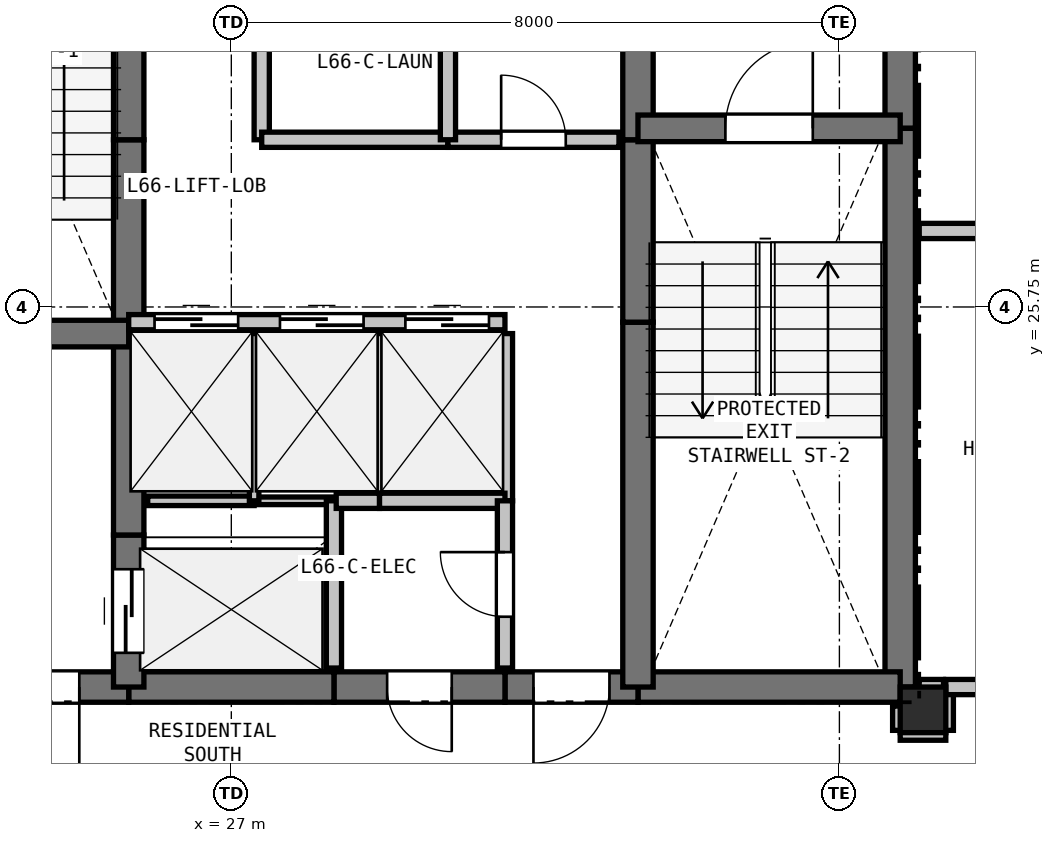
"""IFC4 building model, lengths in metres.
Left out: names, types, materials, properties, quantities, classifications, styles, units other than length and angle.
Written with IfcOpenShell. Run it as: python <this file> out.ifc"""

import sys

from ifc_helpers import new_model, si_unit, direction, frame, frame_2d, origin, origin_2d, place, context, subcontext, project, spatial, rectangle, extrude, element, fill, save


model = new_model("IFC4")
c1 = context("Model", 3, precision=1e-05, world=origin(), true_north=direction((0.0, 1.0)))
c2 = subcontext(c1, "Body", "Model", "MODEL_VIEW")
j1 = project(units=[si_unit("LENGTHUNIT", "METRE"), si_unit("PLANEANGLEUNIT", "RADIAN")], contexts=[c1])
p1 = place(None, origin())
s1 = spatial("IfcSite", under=j1, at=p1, CompositionType="ELEMENT")
p2 = place(p1, origin())
s2 = spatial("IfcBuilding", under=s1, at=p2, CompositionType="ELEMENT")
p3 = place(p2, frame((0.0, 0.0, 236.4)))
s3 = spatial("IfcBuildingStorey", under=s2, at=p3, CompositionType="ELEMENT", Elevation=236.4)
p4 = place(p3, frame((36.1, 20.45, 0.0), z_axis=(0.0, 0.0, 1.0), x_axis=(1.0, 0.0, 0.0)))
e1 = element("IfcColumn", 1, at=p4, inside=s3, PredefinedType="COLUMN", context=c2, shape_type="SweptSolid", body=[
    extrude(rectangle(XDim=0.6, YDim=0.6, at=origin_2d()), origin(), (0.0, 0.0, 1.0), 3.3),
])
p5 = place(p3, frame((35.8, 32.75, 0.0), z_axis=(0.0, 0.0, 1.0), x_axis=(0.0, -1.0, 0.0)))
e2 = element("IfcWall", 2, at=p5, inside=s3, PredefinedType="SHEAR", context=c2, shape_type="SweptSolid", body=[
    extrude(rectangle(XDim=4.65, YDim=0.4, at=frame_2d((2.325, 0.0))), origin(), (0.0, 0.0, 1.0), 3.08),
])
p6 = place(p3, frame((35.8, 28.1, 0.0), z_axis=(0.0, 0.0, 1.0), x_axis=(0.0, -1.0, 0.0)))
e3 = element("IfcWall", 3, at=p6, inside=s3, PredefinedType="SHEAR", context=c2, shape_type="SweptSolid", body=[
    extrude(rectangle(XDim=7.35, YDim=0.4, at=frame_2d((3.675, 0.0))), origin(), (0.0, 0.0, 1.0), 3.08),
])
p7 = place(p3, frame((35.8, 20.75, 0.0), z_axis=(0.0, 0.0, 1.0), x_axis=(-1.0, 0.0, 0.0)))
e4 = element("IfcWall", 4, at=p7, inside=s3, PredefinedType="SHEAR", context=c2, shape_type="SweptSolid", body=[
    extrude(rectangle(XDim=3.45, YDim=0.4, at=frame_2d((1.725, 0.0))), origin(), (0.0, 0.0, 1.0), 3.08),
])
p8 = place(p3, frame((32.35, 20.75, 0.0), z_axis=(0.0, 0.0, 1.0), x_axis=(-1.0, 0.0, 0.0)))
e5 = element("IfcWall", 5, at=p8, inside=s3, PredefinedType="SHEAR", context=c2, shape_type="SweptSolid", body=[
    extrude(rectangle(XDim=1.75, YDim=0.4, at=frame_2d((0.875, 0.0))), origin(), (0.0, 0.0, 1.0), 3.08),
])
p9 = place(p8, frame((0.375, 0.0, 0.0)))
e6 = element("IfcOpeningElement", 6, at=p9, cuts=e5, PredefinedType="OPENING", context=c2, shape_type="SweptSolid", body=[
    extrude(rectangle(XDim=1.0, YDim=2.15, at=frame_2d((0.5, 1.075))), frame((0.0, 0.21, 0.0), z_axis=(0.0, -1.0, 0.0), x_axis=(1.0, 0.0, 0.0)), (0.0, 0.0, 1.0), 0.42),
])
p10 = place(p3, frame((30.6, 20.75, 0.0), z_axis=(0.0, 0.0, 1.0), x_axis=(-1.0, 0.0, 0.0)))
e7 = element("IfcWall", 7, at=p10, inside=s3, PredefinedType="SHEAR", context=c2, shape_type="SweptSolid", body=[
    extrude(rectangle(XDim=2.25, YDim=0.4, at=frame_2d((1.125, 0.0))), origin(), (0.0, 0.0, 1.0), 3.08),
])
p11 = place(p10, frame((0.7, 0.0, 0.0)))
e8 = element("IfcOpeningElement", 8, at=p11, cuts=e7, PredefinedType="OPENING", context=c2, shape_type="SweptSolid", body=[
    extrude(rectangle(XDim=0.85, YDim=2.1, at=frame_2d((0.425, 1.05))), frame((0.0, 0.21, 0.0), z_axis=(0.0, -1.0, 0.0), x_axis=(1.0, 0.0, 0.0)), (0.0, 0.0, 1.0), 0.42),
])
p12 = place(p3, frame((28.35, 20.75, 0.0), z_axis=(0.0, 0.0, 1.0), x_axis=(-1.0, 0.0, 0.0)))
e9 = element("IfcWall", 9, at=p12, inside=s3, PredefinedType="SHEAR", context=c2, shape_type="SweptSolid", body=[
    extrude(rectangle(XDim=2.7, YDim=0.4, at=frame_2d((1.35, 0.0))), origin(), (0.0, 0.0, 1.0), 3.08),
])
p13 = place(p3, frame((25.65, 20.75, 0.0), z_axis=(0.0, 0.0, 1.0), x_axis=(-1.0, 0.0, 0.0)))
e10 = element("IfcWall", 10, at=p13, inside=s3, PredefinedType="SHEAR", context=c2, shape_type="SweptSolid", body=[
    extrude(rectangle(XDim=3.45, YDim=0.4, at=frame_2d((1.725, 0.0))), origin(), (0.0, 0.0, 1.0), 3.08),
])
p14 = place(p13, frame((0.65, 0.0, 0.0)))
e11 = element("IfcOpeningElement", 11, at=p14, cuts=e10, PredefinedType="OPENING", context=c2, shape_type="SweptSolid", body=[
    extrude(rectangle(XDim=1.15, YDim=2.15, at=frame_2d((0.575, 1.075))), frame((0.0, 0.21, 0.0), z_axis=(0.0, -1.0, 0.0), x_axis=(1.0, 0.0, 0.0)), (0.0, 0.0, 1.0), 0.42),
])
p15 = place(p3, frame((25.65, 20.75, 0.0), z_axis=(0.0, 0.0, 1.0), x_axis=(0.0, 1.0, 0.0)))
e12 = element("IfcWall", 12, at=p15, inside=s3, PredefinedType="SHEAR", context=c2, shape_type="SweptSolid", body=[
    extrude(rectangle(XDim=2.0, YDim=0.4, at=frame_2d((1.0, 0.0))), origin(), (0.0, 0.0, 1.0), 3.08),
])
p16 = place(p15, frame((0.45, 0.0, 0.0)))
e13 = element("IfcOpeningElement", 13, at=p16, cuts=e12, PredefinedType="OPENING", context=c2, shape_type="SweptSolid", body=[
    extrude(rectangle(XDim=1.1, YDim=2.15, at=frame_2d((0.55, 1.075))), frame((0.0, 0.21, 0.0), z_axis=(0.0, -1.0, 0.0), x_axis=(1.0, 0.0, 0.0)), (0.0, 0.0, 1.0), 0.42),
])
p17 = place(p3, frame((25.65, 22.75, 0.0), z_axis=(0.0, 0.0, 1.0), x_axis=(0.0, 1.0, 0.0)))
e14 = element("IfcWall", 14, at=p17, inside=s3, PredefinedType="SHEAR", context=c2, shape_type="SweptSolid", body=[
    extrude(rectangle(XDim=2.8, YDim=0.4, at=frame_2d((1.4, 0.0))), origin(), (0.0, 0.0, 1.0), 3.08),
])
p18 = place(p3, frame((25.65, 25.55, 0.0), z_axis=(0.0, 0.0, 1.0), x_axis=(0.0, 1.0, 0.0)))
e15 = element("IfcWall", 15, at=p18, inside=s3, PredefinedType="SHEAR", context=c2, shape_type="SweptSolid", body=[
    extrude(rectangle(XDim=2.4, YDim=0.4, at=frame_2d((1.2, 0.0))), origin(), (0.0, 0.0, 1.0), 3.08),
])
for number, where, z_axis, x_axis in (
    (16, (25.65, 27.95, 0.0), (0.0, 0.0, 1.0), (0.0, 1.0, 0.0)),
    (17, (32.35, 20.75, 0.0), (0.0, 0.0, 1.0), (0.0, 1.0, 0.0)),
):
    element("IfcWall", number, at=place(p3, frame(where, z_axis=z_axis, x_axis=x_axis)), inside=s3, PredefinedType="SHEAR", context=c2, shape_type="SweptSolid", body=[
        extrude(rectangle(XDim=4.8, YDim=0.4, at=frame_2d((2.4, 0.0))), origin(), (0.0, 0.0, 1.0), 3.08),
    ])
p19 = place(p3, frame((32.35, 25.55, 0.0), z_axis=(0.0, 0.0, 1.0), x_axis=(0.0, 1.0, 0.0)))
e18 = element("IfcWall", 18, at=p19, inside=s3, PredefinedType="SHEAR", context=c2, shape_type="SweptSolid", body=[
    extrude(rectangle(XDim=2.4, YDim=0.4, at=frame_2d((1.2, 0.0))), origin(), (0.0, 0.0, 1.0), 3.08),
])
p20 = place(p3, frame((32.35, 27.95, 0.0), z_axis=(0.0, 0.0, 1.0), x_axis=(0.0, 1.0, 0.0)))
e19 = element("IfcWall", 19, at=p20, inside=s3, PredefinedType="SHEAR", context=c2, shape_type="SweptSolid", body=[
    extrude(rectangle(XDim=2.8, YDim=0.4, at=frame_2d((1.4, 0.0))), origin(), (0.0, 0.0, 1.0), 3.08),
])
p21 = place(p3, frame((22.2, 25.4, 0.0), z_axis=(0.0, 0.0, 1.0), x_axis=(1.0, 0.0, 0.0)))
e20 = element("IfcWall", 20, at=p21, inside=s3, PredefinedType="SHEAR", context=c2, shape_type="SweptSolid", body=[
    extrude(rectangle(XDim=3.45, YDim=0.35, at=frame_2d((1.725, 0.0))), origin(), (0.0, 0.0, 1.0), 3.08),
])
p22 = place(p21, frame((1.15, 0.0, 0.0)))
e21 = element("IfcOpeningElement", 21, at=p22, cuts=e20, PredefinedType="OPENING", context=c2, shape_type="SweptSolid", body=[
    extrude(rectangle(XDim=1.15, YDim=2.15, at=frame_2d((0.575, 1.075))), frame((0.0, 0.185, 0.0), z_axis=(0.0, -1.0, 0.0), x_axis=(1.0, 0.0, 0.0)), (0.0, 0.0, 1.0), 0.37),
])
p23 = place(p3, frame((32.35, 28.1, 0.0), z_axis=(0.0, 0.0, 1.0), x_axis=(1.0, 0.0, 0.0)))
e22 = element("IfcWall", 22, at=p23, inside=s3, PredefinedType="SHEAR", context=c2, shape_type="SweptSolid", body=[
    extrude(rectangle(XDim=3.45, YDim=0.35, at=frame_2d((1.725, 0.0))), origin(), (0.0, 0.0, 1.0), 3.08),
])
p24 = place(p23, frame((1.15, 0.0, 0.0)))
e23 = element("IfcOpeningElement", 23, at=p24, cuts=e22, PredefinedType="OPENING", context=c2, shape_type="SweptSolid", body=[
    extrude(rectangle(XDim=1.15, YDim=2.15, at=frame_2d((0.575, 1.075))), frame((0.0, 0.185, 0.0), z_axis=(0.0, -1.0, 0.0), x_axis=(1.0, 0.0, 0.0)), (0.0, 0.0, 1.0), 0.37),
])
p25 = place(p3, frame((25.65, 25.55, 0.0), z_axis=(0.0, 0.0, 1.0), x_axis=(1.0, 0.0, 0.0)))
e24 = element("IfcWall", 24, at=p25, inside=s3, PredefinedType="PARTITIONING", context=c2, shape_type="SweptSolid", body=[
    extrude(rectangle(XDim=4.95, YDim=0.2, at=frame_2d((2.475, 0.0))), origin(), (0.0, 0.0, 1.0), 3.08),
])
p26 = place(p25, frame((0.34, 0.0, 0.0)))
e25 = element("IfcOpeningElement", 25, at=p26, cuts=e24, PredefinedType="OPENING", context=c2, shape_type="SweptSolid", body=[
    extrude(rectangle(XDim=1.1, YDim=2.15, at=frame_2d((0.55, 1.075))), frame((0.0, 0.11, 0.0), z_axis=(0.0, -1.0, 0.0), x_axis=(1.0, 0.0, 0.0)), (0.0, 0.0, 1.0), 0.22),
])
p27 = place(p25, frame((1.99, 0.0, 0.0)))
e26 = element("IfcOpeningElement", 26, at=p27, cuts=e24, PredefinedType="OPENING", context=c2, shape_type="SweptSolid", body=[
    extrude(rectangle(XDim=1.1, YDim=2.15, at=frame_2d((0.55, 1.075))), frame((0.0, 0.11, 0.0), z_axis=(0.0, -1.0, 0.0), x_axis=(1.0, 0.0, 0.0)), (0.0, 0.0, 1.0), 0.22),
])
p28 = place(p25, frame((3.64, 0.0, 0.0)))
e27 = element("IfcOpeningElement", 27, at=p28, cuts=e24, PredefinedType="OPENING", context=c2, shape_type="SweptSolid", body=[
    extrude(rectangle(XDim=1.1, YDim=2.15, at=frame_2d((0.55, 1.075))), frame((0.0, 0.11, 0.0), z_axis=(0.0, -1.0, 0.0), x_axis=(1.0, 0.0, 0.0)), (0.0, 0.0, 1.0), 0.22),
])
p29 = place(p3, frame((25.9, 23.2, 0.0), z_axis=(0.0, 0.0, 1.0), x_axis=(1.0, 0.0, 0.0)))
e28 = element("IfcWall", 28, at=p29, inside=s3, PredefinedType="PARTITIONING", context=c2, shape_type="SweptSolid", body=[
    extrude(rectangle(XDim=1.4, YDim=0.125, at=frame_2d((0.7, 0.0))), origin(), (0.0, 0.0, 1.0), 3.08),
])
p30 = place(p3, frame((27.3, 23.2, 0.0), z_axis=(0.0, 0.0, 1.0), x_axis=(1.0, 0.0, 0.0)))
e29 = element("IfcWall", 29, at=p30, inside=s3, PredefinedType="PARTITIONING", context=c2, shape_type="SweptSolid", body=[
    extrude(rectangle(XDim=1.05, YDim=0.1, at=frame_2d((0.525, 0.0))), origin(), (0.0, 0.0, 1.0), 3.08),
])
p31 = place(p3, frame((28.35, 23.2, 0.0), z_axis=(0.0, 0.0, 1.0), x_axis=(0.0, -1.0, 0.0)))
e30 = element("IfcWall", 30, at=p31, inside=s3, PredefinedType="PARTITIONING", context=c2, shape_type="SweptSolid", body=[
    extrude(rectangle(XDim=2.2, YDim=0.2, at=frame_2d((1.1, 0.0))), origin(), (0.0, 0.0, 1.0), 3.08),
])
p32 = place(p3, frame((27.3, 25.4, 0.0), z_axis=(0.0, 0.0, 1.0), x_axis=(0.0, -1.0, 0.0)))
e31 = element("IfcWall", 31, at=p32, inside=s3, PredefinedType="PARTITIONING", context=c2, shape_type="SweptSolid", body=[
    extrude(rectangle(XDim=2.2, YDim=0.125, at=frame_2d((1.1, 0.0))), origin(), (0.0, 0.0, 1.0), 3.08),
])
p33 = place(p3, frame((28.95, 25.4, 0.0), z_axis=(0.0, 0.0, 1.0), x_axis=(0.0, -1.0, 0.0)))
e32 = element("IfcWall", 32, at=p33, inside=s3, PredefinedType="PARTITIONING", context=c2, shape_type="SweptSolid", body=[
    extrude(rectangle(XDim=2.2, YDim=0.1, at=frame_2d((1.1, 0.0))), origin(), (0.0, 0.0, 1.0), 3.08),
])
p34 = place(p3, frame((28.95, 23.2, 0.0), z_axis=(0.0, 0.0, 1.0), x_axis=(-1.0, 0.0, 0.0)))
e33 = element("IfcWall", 33, at=p34, inside=s3, PredefinedType="PARTITIONING", context=c2, shape_type="SweptSolid", body=[
    extrude(rectangle(XDim=0.57, YDim=0.2, at=frame_2d((0.285, 0.0))), origin(), (0.0, 0.0, 1.0), 3.08),
])
p35 = place(p3, frame((30.6, 25.4, 0.0), z_axis=(0.0, 0.0, 1.0), x_axis=(0.0, -1.0, 0.0)))
e34 = element("IfcWall", 34, at=p35, inside=s3, PredefinedType="PARTITIONING", context=c2, shape_type="SweptSolid", body=[
    extrude(rectangle(XDim=2.2, YDim=0.2, at=frame_2d((1.1, 0.0))), origin(), (0.0, 0.0, 1.0), 3.08),
])
p36 = place(p3, frame((30.6, 23.2, 0.0), z_axis=(0.0, 0.0, 1.0), x_axis=(-1.0, 0.0, 0.0)))
e35 = element("IfcWall", 35, at=p36, inside=s3, PredefinedType="PARTITIONING", context=c2, shape_type="SweptSolid", body=[
    extrude(rectangle(XDim=1.65, YDim=0.2, at=frame_2d((0.825, 0.0))), origin(), (0.0, 0.0, 1.0), 3.08),
])
p37 = place(p3, frame((30.6, 21.0, 0.0), z_axis=(0.0, 0.0, 1.0), x_axis=(0.0, 1.0, 0.0)))
e36 = element("IfcWall", 36, at=p37, inside=s3, PredefinedType="PARTITIONING", context=c2, shape_type="SweptSolid", body=[
    extrude(rectangle(XDim=2.2, YDim=0.2, at=frame_2d((1.1, 0.0))), origin(), (0.0, 0.0, 1.0), 3.08),
])
p38 = place(p37, frame((0.675, 0.0, 0.0)))
e37 = element("IfcOpeningElement", 37, at=p38, cuts=e36, PredefinedType="OPENING", context=c2, shape_type="SweptSolid", body=[
    extrude(rectangle(XDim=0.85, YDim=2.1, at=frame_2d((0.425, 1.05))), frame((0.0, 0.11, 0.0), z_axis=(0.0, -1.0, 0.0), x_axis=(1.0, 0.0, 0.0)), (0.0, 0.0, 1.0), 0.22),
])
p39 = place(p3, frame((27.4, 32.5, 0.0), z_axis=(0.0, 0.0, 1.0), x_axis=(0.0, -1.0, 0.0)))
e38 = element("IfcWall", 38, at=p39, inside=s3, PredefinedType="PARTITIONING", context=c2, shape_type="SweptSolid", body=[
    extrude(rectangle(XDim=4.55, YDim=0.2, at=frame_2d((2.275, 0.0))), origin(), (0.0, 0.0, 1.0), 3.08),
])
p40 = place(p39, frame((1.775, 0.0, 0.0)))
e39 = element("IfcOpeningElement", 39, at=p40, cuts=e38, PredefinedType="OPENING", context=c2, shape_type="SweptSolid", body=[
    extrude(rectangle(XDim=1.0, YDim=2.15, at=frame_2d((0.5, 1.075))), frame((0.0, 0.11, 0.0), z_axis=(0.0, -1.0, 0.0), x_axis=(1.0, 0.0, 0.0)), (0.0, 0.0, 1.0), 0.22),
])
p41 = place(p3, frame((27.4, 27.95, 0.0), z_axis=(0.0, 0.0, 1.0), x_axis=(1.0, 0.0, 0.0)))
e40 = element("IfcWall", 40, at=p41, inside=s3, PredefinedType="PARTITIONING", context=c2, shape_type="SweptSolid", body=[
    extrude(rectangle(XDim=2.45, YDim=0.2, at=frame_2d((1.225, 0.0))), origin(), (0.0, 0.0, 1.0), 3.08),
])
p42 = place(p3, frame((29.85, 27.95, 0.0), z_axis=(0.0, 0.0, 1.0), x_axis=(1.0, 0.0, 0.0)))
e41 = element("IfcWall", 41, at=p42, inside=s3, PredefinedType="PARTITIONING", context=c2, shape_type="SweptSolid", body=[
    extrude(rectangle(XDim=2.25, YDim=0.2, at=frame_2d((1.125, 0.0))), origin(), (0.0, 0.0, 1.0), 3.08),
])
p43 = place(p42, frame((0.7, 0.0, 0.0)))
e42 = element("IfcOpeningElement", 42, at=p43, cuts=e41, PredefinedType="OPENING", context=c2, shape_type="SweptSolid", body=[
    extrude(rectangle(XDim=0.85, YDim=2.1, at=frame_2d((0.425, 1.05))), frame((0.0, 0.11, 0.0), z_axis=(0.0, -1.0, 0.0), x_axis=(1.0, 0.0, 0.0)), (0.0, 0.0, 1.0), 0.22),
])
p44 = place(p3, frame((35.8, 20.15, 0.0), z_axis=(0.0, 0.0, 1.0), x_axis=(1.0, 0.0, 0.0)))
e43 = element("IfcWall", 43, at=p44, inside=s3, PredefinedType="PARTITIONING", context=c2, shape_type="SweptSolid", body=[
    extrude(rectangle(XDim=0.6, YDim=0.2, at=frame_2d((0.3, 0.0))), origin(), (0.0, 0.0, 1.0), 2.528),
])
p45 = place(p3, frame((36.4, 20.18, 0.0), z_axis=(0.0, 0.0, 1.0), x_axis=(0.0, 1.0, 0.0)))
e44 = element("IfcWall", 44, at=p45, inside=s3, PredefinedType="PARTITIONING", context=c2, shape_type="SweptSolid", body=[
    extrude(rectangle(XDim=0.57, YDim=0.2, at=frame_2d((0.285, 0.0))), origin(), (0.0, 0.0, 1.0), 3.08),
])
p46 = place(p3, frame((36.4, 20.75, 0.0), z_axis=(0.0, 0.0, 1.0), x_axis=(1.0, 0.0, 0.0)))
e45 = element("IfcWall", 45, at=p46, inside=s3, PredefinedType="PARTITIONING", context=c2, shape_type="SweptSolid", body=[
    extrude(rectangle(XDim=1.8, YDim=0.2, at=frame_2d((0.9, 0.0))), origin(), (0.0, 0.0, 1.0), 3.08),
])
p47 = place(p46, frame((0.475, 0.0, 0.0)))
e46 = element("IfcOpeningElement", 46, at=p47, cuts=e45, PredefinedType="OPENING", context=c2, shape_type="SweptSolid", body=[
    extrude(rectangle(XDim=0.85, YDim=2.1, at=frame_2d((0.425, 1.05))), frame((0.0, 0.11, 0.0), z_axis=(0.0, -1.0, 0.0), x_axis=(1.0, 0.0, 0.0)), (0.0, 0.0, 1.0), 0.22),
])
p48 = place(p3, frame((35.8, 20.5, 0.0), z_axis=(0.0, 0.0, 1.0), x_axis=(0.0, -1.0, 0.0)))
e47 = element("IfcWall", 47, at=p48, inside=s3, PredefinedType="PARTITIONING", context=c2, shape_type="SweptSolid", body=[
    extrude(rectangle(XDim=0.32, YDim=0.2, at=frame_2d((0.16, 0.0))), origin(), (0.0, 0.0, 1.0), 2.605),
])
p49 = place(p3, frame((29.85, 30.3, 0.0), z_axis=(0.0, 0.0, 1.0), x_axis=(0.0, -1.0, 0.0)))
e48 = element("IfcWall", 48, at=p49, inside=s3, PredefinedType="PARTITIONING", context=c2, shape_type="SweptSolid", body=[
    extrude(rectangle(XDim=2.35, YDim=0.2, at=frame_2d((1.175, 0.0))), origin(), (0.0, 0.0, 1.0), 3.08),
])
p50 = place(p3, frame((39.703, 26.75, 0.0), z_axis=(0.0, 0.0, 1.0), x_axis=(-1.0, 0.0, 0.0)))
e49 = element("IfcWall", 49, at=p50, inside=s3, PredefinedType="PARTITIONING", context=c2, shape_type="SweptSolid", body=[
    extrude(rectangle(XDim=3.653, YDim=0.2, at=frame_2d((1.826, 0.0))), origin(), (0.0, 0.0, 1.0), 2.365),
])
p51 = place(p3, frame((36.37, 20.75, 0.0), z_axis=(0.0, 0.0, 1.0), x_axis=(-1.0, 0.0, 0.0)))
e50 = element("IfcWall", 50, at=p51, inside=s3, PredefinedType="PARTITIONING", context=c2, shape_type="SweptSolid", body=[
    extrude(rectangle(XDim=0.32, YDim=0.2, at=frame_2d((0.16, 0.0))), origin(), (0.0, 0.0, 1.0), 2.605),
])
p52 = place(p26, origin())
e51 = element("IfcDoor", 51, at=p52, inside=s3, OperationType="SLIDING_TO_LEFT", PredefinedType="DOOR", context=c2, shape_type="SweptSolid", body=[
    extrude(rectangle(XDim=1.1, YDim=2.15, at=frame_2d((0.55, 1.075))), frame((0.0, 0.025, 0.0), z_axis=(0.0, -1.0, 0.0), x_axis=(1.0, 0.0, 0.0)), (0.0, 0.0, 1.0), 0.05),
])
fill(e25, e51)
p53 = place(p27, origin())
e52 = element("IfcDoor", 52, at=p53, inside=s3, OperationType="SLIDING_TO_LEFT", PredefinedType="DOOR", context=c2, shape_type="SweptSolid", body=[
    extrude(rectangle(XDim=1.1, YDim=2.15, at=frame_2d((0.55, 1.075))), frame((0.0, 0.025, 0.0), z_axis=(0.0, -1.0, 0.0), x_axis=(1.0, 0.0, 0.0)), (0.0, 0.0, 1.0), 0.05),
])
fill(e26, e52)
p54 = place(p28, origin())
e53 = element("IfcDoor", 53, at=p54, inside=s3, OperationType="SLIDING_TO_LEFT", PredefinedType="DOOR", context=c2, shape_type="SweptSolid", body=[
    extrude(rectangle(XDim=1.1, YDim=2.15, at=frame_2d((0.55, 1.075))), frame((0.0, 0.025, 0.0), z_axis=(0.0, -1.0, 0.0), x_axis=(1.0, 0.0, 0.0)), (0.0, 0.0, 1.0), 0.05),
])
fill(e27, e53)
p55 = place(p9, origin())
e54 = element("IfcDoor", 54, at=p55, inside=s3, OperationType="SINGLE_SWING_RIGHT", PredefinedType="DOOR", context=c2, shape_type="SweptSolid", body=[
    extrude(rectangle(XDim=1.0, YDim=2.15, at=frame_2d((0.5, 1.075))), frame((0.0, 0.025, 0.0), z_axis=(0.0, -1.0, 0.0), x_axis=(1.0, 0.0, 0.0)), (0.0, 0.0, 1.0), 0.05),
])
fill(e6, e54)
p56 = place(p16, origin())
e55 = element("IfcDoor", 55, at=p56, inside=s3, OperationType="SLIDING_TO_LEFT", PredefinedType="DOOR", context=c2, shape_type="SweptSolid", body=[
    extrude(rectangle(XDim=1.1, YDim=2.15, at=frame_2d((0.55, 1.075))), frame((0.0, 0.025, 0.0), z_axis=(0.0, -1.0, 0.0), x_axis=(1.0, 0.0, 0.0)), (0.0, 0.0, 1.0), 0.05),
])
fill(e13, e55)
p57 = place(p24, origin())
e56 = element("IfcDoor", 56, at=p57, inside=s3, OperationType="SINGLE_SWING_RIGHT", PredefinedType="DOOR", context=c2, shape_type="SweptSolid", body=[
    extrude(rectangle(XDim=1.15, YDim=2.15, at=frame_2d((0.575, 1.075))), frame((0.0, 0.025, 0.0), z_axis=(0.0, -1.0, 0.0), x_axis=(1.0, 0.0, 0.0)), (0.0, 0.0, 1.0), 0.05),
])
fill(e23, e56)
p58 = place(p14, origin())
e57 = element("IfcDoor", 57, at=p58, inside=s3, OperationType="SINGLE_SWING_LEFT", PredefinedType="DOOR", context=c2, shape_type="SweptSolid", body=[
    extrude(rectangle(XDim=1.15, YDim=2.15, at=frame_2d((0.575, 1.075))), frame((0.0, 0.025, 0.0), z_axis=(0.0, -1.0, 0.0), x_axis=(1.0, 0.0, 0.0)), (0.0, 0.0, 1.0), 0.05),
])
fill(e11, e57)
p59 = place(p43, origin())
e58 = element("IfcDoor", 58, at=p59, inside=s3, OperationType="SINGLE_SWING_LEFT", PredefinedType="DOOR", context=c2, shape_type="SweptSolid", body=[
    extrude(rectangle(XDim=0.85, YDim=2.1, at=frame_2d((0.425, 1.05))), frame((0.0, 0.025, 0.0), z_axis=(0.0, -1.0, 0.0), x_axis=(1.0, 0.0, 0.0)), (0.0, 0.0, 1.0), 0.05),
])
fill(e42, e58)
p60 = place(p38, origin())
e59 = element("IfcDoor", 59, at=p60, inside=s3, OperationType="SINGLE_SWING_RIGHT", PredefinedType="DOOR", context=c2, shape_type="SweptSolid", body=[
    extrude(rectangle(XDim=0.85, YDim=2.1, at=frame_2d((0.425, 1.05))), frame((0.0, 0.025, 0.0), z_axis=(0.0, -1.0, 0.0), x_axis=(1.0, 0.0, 0.0)), (0.0, 0.0, 1.0), 0.05),
])
fill(e37, e59)
p61 = place(p11, origin())
e60 = element("IfcDoor", 60, at=p61, inside=s3, OperationType="SINGLE_SWING_LEFT", PredefinedType="DOOR", context=c2, shape_type="SweptSolid", body=[
    extrude(rectangle(XDim=0.85, YDim=2.1, at=frame_2d((0.425, 1.05))), frame((0.0, 0.025, 0.0), z_axis=(0.0, -1.0, 0.0), x_axis=(1.0, 0.0, 0.0)), (0.0, 0.0, 1.0), 0.05),
])
fill(e8, e60)
save(model, sys.argv[1])
